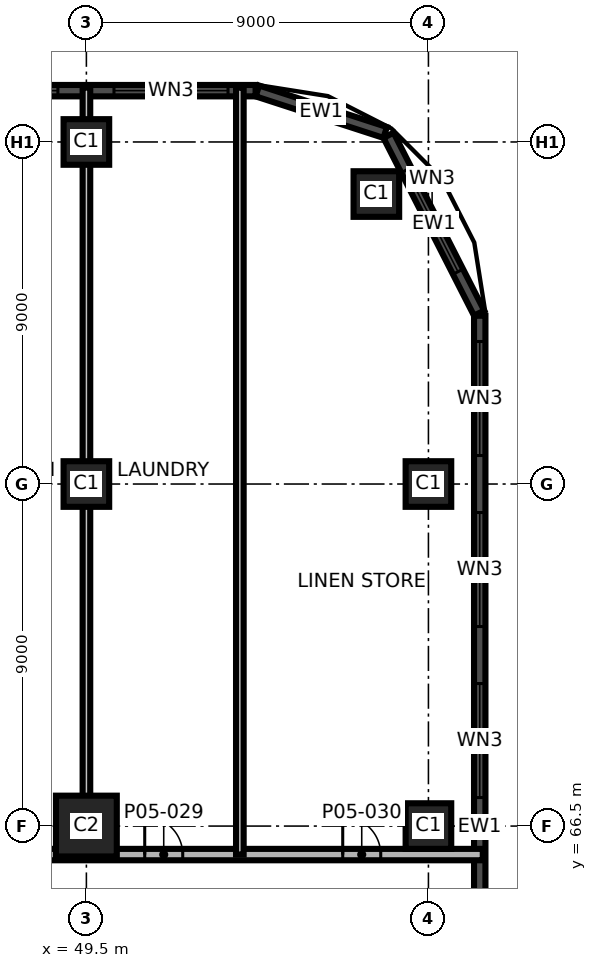
"""IFC4 building model, lengths in metres.
Left out: names, types, materials, properties, quantities, classifications, styles, units other than length and angle.
Written with IfcOpenShell. Run it as: python <this file> out.ifc"""

import sys

from ifc_helpers import new_model, si_unit, direction, frame, frame_2d, origin, origin_2d, place, context, subcontext, project, spatial, rectangle, extrude, element, fill, save


model = new_model("IFC4")
c1 = context("Model", 3, precision=1e-05, world=origin(), true_north=direction((0.0, 1.0)))
c2 = subcontext(c1, "Body", "Model", "MODEL_VIEW")
j1 = project(units=[si_unit("LENGTHUNIT", "METRE"), si_unit("PLANEANGLEUNIT", "RADIAN")], contexts=[c1])
p1 = place(None, origin())
s1 = spatial("IfcSite", under=j1, at=p1, CompositionType="ELEMENT")
p2 = place(p1, origin())
s2 = spatial("IfcBuilding", under=s1, at=p2, CompositionType="ELEMENT")
p3 = place(p2, frame((0.0, 0.0, 28.5)))
s3 = spatial("IfcBuildingStorey", under=s2, at=p3, CompositionType="ELEMENT", Elevation=28.5)
p4 = place(p3, frame((49.5, 66.5, 0.0), z_axis=(0.0, 0.0, 1.0), x_axis=(1.0, 0.0, 0.0)))
e1 = element("IfcColumn", 1, at=p4, inside=s3, PredefinedType="COLUMN", context=c2, shape_type="SweptSolid", body=[
    extrude(rectangle(XDim=1.6, YDim=1.6, at=origin_2d()), origin(), (0.0, 0.0, 1.0), 5.0),
])
for number, where, z_axis, x_axis in (
    (2, (58.5, 66.5, 0.0), (0.0, 0.0, 1.0), (1.0, 0.0, 0.0)),
    (3, (49.5, 75.5, 0.0), (0.0, 0.0, 1.0), (1.0, 0.0, 0.0)),
    (4, (58.5, 75.5, 0.0), (0.0, 0.0, 1.0), (1.0, 0.0, 0.0)),
    (5, (57.13, 83.13, 0.0), (0.0, 0.0, 1.0), (1.0, 0.0, 0.0)),
    (6, (49.5, 84.5, 0.0), (0.0, 0.0, 1.0), (1.0, 0.0, 0.0)),
):
    element("IfcColumn", number, at=place(p3, frame(where, z_axis=z_axis, x_axis=x_axis)), inside=s3, PredefinedType="COLUMN", context=c2, shape_type="SweptSolid", body=[
        extrude(rectangle(XDim=1.2, YDim=1.2, at=origin_2d()), origin(), (0.0, 0.0, 1.0), 5.0),
    ])
p5 = place(p3, frame((59.85, 53.0, 0.0), z_axis=(0.0, 0.0, 1.0), x_axis=(0.0, 1.0, 0.0)))
e7 = element("IfcWall", 7, at=p5, inside=s3, PredefinedType="SOLIDWALL", context=c2, shape_type="SweptSolid", body=[
    extrude(rectangle(XDim=26.928, YDim=0.3, at=frame_2d((13.464, 0.0))), origin(), (0.0, 0.0, 1.0), 4.7),
])
p6 = place(p5, frame((5.25, 0.0, 0.9)))
e8 = element("IfcOpeningElement", 8, at=p6, cuts=e7, PredefinedType="OPENING", context=c2, shape_type="SweptSolid", body=[
    extrude(rectangle(XDim=3.0, YDim=2.4, at=frame_2d((1.5, 1.2))), frame((0.0, 0.16, 0.0), z_axis=(0.0, -1.0, 0.0), x_axis=(1.0, 0.0, 0.0)), (0.0, 0.0, 1.0), 0.32),
])
p7 = place(p5, frame((14.25, 0.0, 0.9)))
e9 = element("IfcOpeningElement", 9, at=p7, cuts=e7, PredefinedType="OPENING", context=c2, shape_type="SweptSolid", body=[
    extrude(rectangle(XDim=3.0, YDim=2.4, at=frame_2d((1.5, 1.2))), frame((0.0, 0.16, 0.0), z_axis=(0.0, -1.0, 0.0), x_axis=(1.0, 0.0, 0.0)), (0.0, 0.0, 1.0), 0.32),
])
p8 = place(p5, frame((18.75, 0.0, 0.9)))
e10 = element("IfcOpeningElement", 10, at=p8, cuts=e7, PredefinedType="OPENING", context=c2, shape_type="SweptSolid", body=[
    extrude(rectangle(XDim=3.0, YDim=2.4, at=frame_2d((1.5, 1.2))), frame((0.0, 0.16, 0.0), z_axis=(0.0, -1.0, 0.0), x_axis=(1.0, 0.0, 0.0)), (0.0, 0.0, 1.0), 0.32),
])
p9 = place(p5, frame((23.25, 0.0, 0.9)))
e11 = element("IfcOpeningElement", 11, at=p9, cuts=e7, PredefinedType="OPENING", context=c2, shape_type="SweptSolid", body=[
    extrude(rectangle(XDim=3.0, YDim=2.4, at=frame_2d((1.5, 1.2))), frame((0.0, 0.16, 0.0), z_axis=(0.0, -1.0, 0.0), x_axis=(1.0, 0.0, 0.0)), (0.0, 0.0, 1.0), 0.32),
])
p10 = place(p3, frame((59.834, 79.996, 0.0), z_axis=(0.0, 0.0, 1.0), x_axis=(-0.454006562826, 0.890998339455, 0.0)))
e12 = element("IfcWall", 12, at=p10, inside=s3, PredefinedType="SOLIDWALL", context=c2, shape_type="SweptSolid", body=[
    extrude(rectangle(XDim=5.252, YDim=0.3, at=frame_2d((2.626, 0.0))), origin(), (0.0, 0.0, 1.0), 4.7),
])
p11 = place(p10, frame((1.224, 0.0, 0.9)))
e13 = element("IfcOpeningElement", 13, at=p11, cuts=e12, PredefinedType="OPENING", context=c2, shape_type="SweptSolid", body=[
    extrude(rectangle(XDim=3.0, YDim=2.4, at=frame_2d((1.5, 1.2))), frame((0.0, 0.16, 0.0), z_axis=(0.0, -1.0, 0.0), x_axis=(1.0, 0.0, 0.0)), (0.0, 0.0, 1.0), 0.32),
])
p12 = place(p3, frame((57.362, 84.75, 0.0), z_axis=(0.0, 0.0, 1.0), x_axis=(-0.951038127287, 0.309073584194, 0.0)))
e14 = element("IfcWall", 14, at=p12, inside=s3, PredefinedType="SOLIDWALL", context=c2, shape_type="SweptSolid", body=[
    extrude(rectangle(XDim=3.536, YDim=0.3, at=frame_2d((1.768, 0.0))), origin(), (0.0, 0.0, 1.0), 4.7),
])
p13 = place(p3, frame((53.952, 85.85, 0.0), z_axis=(0.0, 0.0, 1.0), x_axis=(-1.0, 0.0, 0.0)))
e15 = element("IfcWall", 15, at=p13, inside=s3, PredefinedType="SOLIDWALL", context=c2, shape_type="SweptSolid", body=[
    extrude(rectangle(XDim=26.88, YDim=0.3, at=frame_2d((13.44, 0.0))), origin(), (0.0, 0.0, 1.0), 4.7),
])
p14 = place(p13, frame((0.726, 0.0, 0.9)))
e16 = element("IfcOpeningElement", 16, at=p14, cuts=e15, PredefinedType="OPENING", context=c2, shape_type="SweptSolid", body=[
    extrude(rectangle(XDim=3.0, YDim=2.4, at=frame_2d((1.5, 1.2))), frame((0.0, 0.16, 0.0), z_axis=(0.0, -1.0, 0.0), x_axis=(1.0, 0.0, 0.0)), (0.0, 0.0, 1.0), 0.32),
])
p15 = place(p13, frame((5.202, 0.0, 0.9)))
e17 = element("IfcOpeningElement", 17, at=p15, cuts=e15, PredefinedType="OPENING", context=c2, shape_type="SweptSolid", body=[
    extrude(rectangle(XDim=3.0, YDim=2.4, at=frame_2d((1.5, 1.2))), frame((0.0, 0.16, 0.0), z_axis=(0.0, -1.0, 0.0), x_axis=(1.0, 0.0, 0.0)), (0.0, 0.0, 1.0), 0.32),
])
p16 = place(p13, frame((9.702, 0.0, 0.9)))
e18 = element("IfcOpeningElement", 18, at=p16, cuts=e15, PredefinedType="OPENING", context=c2, shape_type="SweptSolid", body=[
    extrude(rectangle(XDim=3.0, YDim=2.4, at=frame_2d((1.5, 1.2))), frame((0.0, 0.16, 0.0), z_axis=(0.0, -1.0, 0.0), x_axis=(1.0, 0.0, 0.0)), (0.0, 0.0, 1.0), 0.32),
])
p17 = place(p13, frame((23.226, 0.0, 0.9)))
e19 = element("IfcOpeningElement", 19, at=p17, cuts=e15, PredefinedType="OPENING", context=c2, shape_type="SweptSolid", body=[
    extrude(rectangle(XDim=3.0, YDim=2.4, at=frame_2d((1.5, 1.2))), frame((0.0, 0.16, 0.0), z_axis=(0.0, -1.0, 0.0), x_axis=(1.0, 0.0, 0.0)), (0.0, 0.0, 1.0), 0.32),
])
p18 = place(p3, frame((21.07, 65.75, 0.0), z_axis=(0.0, 0.0, 1.0), x_axis=(1.0, 0.0, 0.0)))
e20 = element("IfcWall", 20, at=p18, inside=s3, PredefinedType="SHEAR", context=c2, shape_type="SweptSolid", body=[
    extrude(rectangle(XDim=38.86, YDim=0.3, at=frame_2d((19.43, 0.0))), origin(), (0.0, 0.0, 1.0), 4.7),
])
p19 = place(p18, frame((20.68, 0.0, 0.0)))
e21 = element("IfcOpeningElement", 21, at=p19, cuts=e20, PredefinedType="OPENING", context=c2, shape_type="SweptSolid", body=[
    extrude(rectangle(XDim=1.2, YDim=2.1, at=frame_2d((0.6, 1.05))), frame((0.0, 0.16, 0.0), z_axis=(0.0, -1.0, 0.0), x_axis=(1.0, 0.0, 0.0)), (0.0, 0.0, 1.0), 0.32),
])
p20 = place(p18, frame((25.431, 0.0, 0.0)))
e22 = element("IfcOpeningElement", 22, at=p20, cuts=e20, PredefinedType="OPENING", context=c2, shape_type="SweptSolid", body=[
    extrude(rectangle(XDim=1.0, YDim=2.1, at=frame_2d((0.5, 1.05))), frame((0.0, 0.16, 0.0), z_axis=(0.0, -1.0, 0.0), x_axis=(1.0, 0.0, 0.0)), (0.0, 0.0, 1.0), 0.32),
])
p21 = place(p18, frame((2.43, 0.0, 0.0)))
e23 = element("IfcOpeningElement", 23, at=p21, cuts=e20, PredefinedType="OPENING", context=c2, shape_type="SweptSolid", body=[
    extrude(rectangle(XDim=1.0, YDim=2.1, at=frame_2d((0.5, 1.05))), frame((0.0, 0.16, 0.0), z_axis=(0.0, -1.0, 0.0), x_axis=(1.0, 0.0, 0.0)), (0.0, 0.0, 1.0), 0.32),
])
p22 = place(p18, frame((7.746, 0.0, 0.0)))
e24 = element("IfcOpeningElement", 24, at=p22, cuts=e20, PredefinedType="OPENING", context=c2, shape_type="SweptSolid", body=[
    extrude(rectangle(XDim=1.0, YDim=2.1, at=frame_2d((0.5, 1.05))), frame((0.0, 0.16, 0.0), z_axis=(0.0, -1.0, 0.0), x_axis=(1.0, 0.0, 0.0)), (0.0, 0.0, 1.0), 0.32),
])
p23 = place(p18, frame((14.549, 0.0, 0.0)))
e25 = element("IfcOpeningElement", 25, at=p23, cuts=e20, PredefinedType="OPENING", context=c2, shape_type="SweptSolid", body=[
    extrude(rectangle(XDim=1.0, YDim=2.1, at=frame_2d((0.5, 1.05))), frame((0.0, 0.16, 0.0), z_axis=(0.0, -1.0, 0.0), x_axis=(1.0, 0.0, 0.0)), (0.0, 0.0, 1.0), 0.32),
])
p24 = place(p18, frame((29.965, 0.0, 0.0)))
e26 = element("IfcOpeningElement", 26, at=p24, cuts=e20, PredefinedType="OPENING", context=c2, shape_type="SweptSolid", body=[
    extrude(rectangle(XDim=1.0, YDim=2.1, at=frame_2d((0.5, 1.05))), frame((0.0, 0.16, 0.0), z_axis=(0.0, -1.0, 0.0), x_axis=(1.0, 0.0, 0.0)), (0.0, 0.0, 1.0), 0.32),
])
p25 = place(p18, frame((35.175, 0.0, 0.0)))
e27 = element("IfcOpeningElement", 27, at=p25, cuts=e20, PredefinedType="OPENING", context=c2, shape_type="SweptSolid", body=[
    extrude(rectangle(XDim=1.0, YDim=2.1, at=frame_2d((0.5, 1.05))), frame((0.0, 0.16, 0.0), z_axis=(0.0, -1.0, 0.0), x_axis=(1.0, 0.0, 0.0)), (0.0, 0.0, 1.0), 0.32),
])
for number, where, z_axis, x_axis in (
    (28, (49.501, 65.75, 0.0), (0.0, 0.0, 1.0), (0.0, 1.0, 0.0)),
    (29, (53.538, 65.75, 0.0), (0.0, 0.0, 1.0), (0.0, 1.0, 0.0)),
):
    element("IfcWall", number, at=place(p3, frame(where, z_axis=z_axis, x_axis=x_axis)), inside=s3, PredefinedType="PARTITIONING", context=c2, shape_type="SweptSolid", body=[
        extrude(rectangle(XDim=20.18, YDim=0.2, at=frame_2d((10.09, 0.0))), origin(), (0.0, 0.0, 1.0), 4.7),
    ])
p26 = place(p7, origin())
e30 = element("IfcWindow", 30, at=p26, inside=s3, PartitioningType="SINGLE_PANEL", PredefinedType="WINDOW", context=c2, shape_type="SweptSolid", body=[
    extrude(rectangle(XDim=3.0, YDim=2.4, at=frame_2d((1.5, 1.2))), frame((0.0, 0.03, 0.0), z_axis=(0.0, -1.0, 0.0), x_axis=(1.0, 0.0, 0.0)), (0.0, 0.0, 1.0), 0.06),
])
fill(e9, e30)
p27 = place(p8, origin())
e31 = element("IfcWindow", 31, at=p27, inside=s3, PartitioningType="SINGLE_PANEL", PredefinedType="WINDOW", context=c2, shape_type="SweptSolid", body=[
    extrude(rectangle(XDim=3.0, YDim=2.4, at=frame_2d((1.5, 1.2))), frame((0.0, 0.03, 0.0), z_axis=(0.0, -1.0, 0.0), x_axis=(1.0, 0.0, 0.0)), (0.0, 0.0, 1.0), 0.06),
])
fill(e10, e31)
p28 = place(p9, origin())
e32 = element("IfcWindow", 32, at=p28, inside=s3, PartitioningType="SINGLE_PANEL", PredefinedType="WINDOW", context=c2, shape_type="SweptSolid", body=[
    extrude(rectangle(XDim=3.0, YDim=2.4, at=frame_2d((1.5, 1.2))), frame((0.0, 0.03, 0.0), z_axis=(0.0, -1.0, 0.0), x_axis=(1.0, 0.0, 0.0)), (0.0, 0.0, 1.0), 0.06),
])
fill(e11, e32)
p29 = place(p11, origin())
e33 = element("IfcWindow", 33, at=p29, inside=s3, PartitioningType="SINGLE_PANEL", PredefinedType="WINDOW", context=c2, shape_type="SweptSolid", body=[
    extrude(rectangle(XDim=3.0, YDim=2.4, at=frame_2d((1.5, 1.2))), frame((0.0, 0.03, 0.0), z_axis=(0.0, -1.0, 0.0), x_axis=(1.0, 0.0, 0.0)), (0.0, 0.0, 1.0), 0.06),
])
fill(e13, e33)
p30 = place(p14, origin())
e34 = element("IfcWindow", 34, at=p30, inside=s3, PartitioningType="SINGLE_PANEL", PredefinedType="WINDOW", context=c2, shape_type="SweptSolid", body=[
    extrude(rectangle(XDim=3.0, YDim=2.4, at=frame_2d((1.5, 1.2))), frame((0.0, 0.03, 0.0), z_axis=(0.0, -1.0, 0.0), x_axis=(1.0, 0.0, 0.0)), (0.0, 0.0, 1.0), 0.06),
])
fill(e16, e34)
p31 = place(p15, origin())
e35 = element("IfcWindow", 35, at=p31, inside=s3, PartitioningType="SINGLE_PANEL", PredefinedType="WINDOW", context=c2, shape_type="SweptSolid", body=[
    extrude(rectangle(XDim=3.0, YDim=2.4, at=frame_2d((1.5, 1.2))), frame((0.0, 0.03, 0.0), z_axis=(0.0, -1.0, 0.0), x_axis=(1.0, 0.0, 0.0)), (0.0, 0.0, 1.0), 0.06),
])
fill(e17, e35)
p32 = place(p24, origin())
e36 = element("IfcDoor", 36, at=p32, inside=s3, OperationType="SINGLE_SWING_LEFT", PredefinedType="DOOR", context=c2, shape_type="SweptSolid", body=[
    extrude(rectangle(XDim=1.0, YDim=2.1, at=frame_2d((0.5, 1.05))), frame((0.0, 0.025, 0.0), z_axis=(0.0, -1.0, 0.0), x_axis=(1.0, 0.0, 0.0)), (0.0, 0.0, 1.0), 0.05),
])
fill(e26, e36)
p33 = place(p25, origin())
e37 = element("IfcDoor", 37, at=p33, inside=s3, OperationType="SINGLE_SWING_RIGHT", PredefinedType="DOOR", context=c2, shape_type="SweptSolid", body=[
    extrude(rectangle(XDim=1.0, YDim=2.1, at=frame_2d((0.5, 1.05))), frame((0.0, 0.025, 0.0), z_axis=(0.0, -1.0, 0.0), x_axis=(1.0, 0.0, 0.0)), (0.0, 0.0, 1.0), 0.05),
])
fill(e27, e37)
save(model, sys.argv[1])
